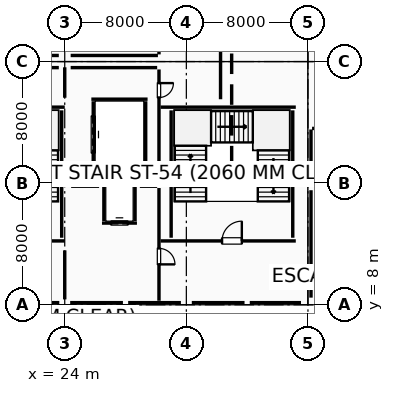
"""IFC4 building model, lengths in metres.
Left out: names, types, materials, properties, quantities, classifications, styles, units other than length and angle.
Written with IfcOpenShell. Run it as: python <this file> out.ifc"""

import sys

from ifc_helpers import new_model, si_unit, direction, frame, frame_2d, origin, origin_2d, place, context, subcontext, project, spatial, rectangle, circle, i_section, extrude, element, fill, save


model = new_model("IFC4")
c1 = context("Model", 3, precision=1e-05, world=origin(), true_north=direction((0.0, 1.0)))
c2 = subcontext(c1, "Body", "Model", "MODEL_VIEW")
j1 = project(units=[si_unit("LENGTHUNIT", "METRE"), si_unit("PLANEANGLEUNIT", "RADIAN")], contexts=[c1])
p1 = place(None, origin())
s1 = spatial("IfcSite", under=j1, at=p1, CompositionType="ELEMENT")
p2 = place(p1, origin())
s2 = spatial("IfcBuilding", under=s1, at=p2, CompositionType="ELEMENT")
p3 = place(p2, origin())
s3 = spatial("IfcBuildingStorey", under=s2, at=p3, CompositionType="ELEMENT", Elevation=0.0)
p4 = place(p3, frame((24.0, 8.0, 0.0), z_axis=(0.0, 0.0, 1.0), x_axis=(1.0, 0.0, 0.0)))
e1 = element("IfcColumn", 1, at=p4, inside=s3, PredefinedType="COLUMN", context=c2, shape_type="SweptSolid", body=[
    extrude(circle(Radius=0.35, at=origin_2d()), origin(), (0.0, 0.0, 1.0), 5.4),
])
p5 = place(p3, frame((24.0, 24.0, 0.0), z_axis=(0.0, 0.0, 1.0), x_axis=(1.0, 0.0, 0.0)))
e2 = element("IfcColumn", 2, at=p5, inside=s3, PredefinedType="COLUMN", context=c2, shape_type="SweptSolid", body=[
    extrude(rectangle(XDim=0.75, YDim=0.75, at=origin_2d()), origin(), (0.0, 0.0, 1.0), 5.4),
])
p6 = place(p3, frame((32.0, 8.0, 0.0), z_axis=(0.0, 0.0, 1.0), x_axis=(1.0, 0.0, 0.0)))
e3 = element("IfcColumn", 3, at=p6, inside=s3, PredefinedType="COLUMN", context=c2, shape_type="SweptSolid", body=[
    extrude(circle(Radius=0.35, at=origin_2d()), origin(), (0.0, 0.0, 1.0), 5.4),
])
p7 = place(p3, frame((32.0, 24.0, 0.0), z_axis=(0.0, 0.0, 1.0), x_axis=(1.0, 0.0, 0.0)))
e4 = element("IfcColumn", 4, at=p7, inside=s3, PredefinedType="COLUMN", context=c2, shape_type="SweptSolid", body=[
    extrude(rectangle(XDim=0.75, YDim=0.75, at=origin_2d()), origin(), (0.0, 0.0, 1.0), 5.4),
])
for number, where, z_axis, x_axis in (
    (5, (40.0, 8.0, 0.0), (0.0, 0.0, 1.0), (1.0, 0.0, 0.0)),
    (6, (40.0, 16.0, 0.0), (0.0, 0.0, 1.0), (1.0, 0.0, 0.0)),
    (7, (40.0, 24.0, 0.0), (0.0, 0.0, 1.0), (1.0, 0.0, 0.0)),
):
    element("IfcColumn", number, at=place(p3, frame(where, z_axis=z_axis, x_axis=x_axis)), inside=s3, PredefinedType="COLUMN", context=c2, shape_type="SweptSolid", body=[
        extrude(rectangle(XDim=0.9, YDim=0.9, at=origin_2d()), origin(), (0.0, 0.0, 1.0), 5.4),
    ])
for number, where, z_axis, x_axis in (
    (8, (33.52, 17.98, 0.0), (0.0, 0.0, 1.0), (1.0, 0.0, 0.0)),
    (9, (36.48, 17.98, 0.0), (0.0, 0.0, 1.0), (1.0, 0.0, 0.0)),
):
    element("IfcColumn", number, at=place(p3, frame(where, z_axis=z_axis, x_axis=x_axis)), inside=s3, PredefinedType="COLUMN", context=c2, shape_type="SweptSolid", body=[
        extrude(i_section(OverallWidth=0.25, OverallDepth=0.35, WebThickness=0.01, FlangeThickness=0.012, FilletRadius=0.012, at=origin_2d()), origin(), (0.0, 0.0, 1.0), 5.4),
    ])
p8 = place(p3, frame((28.0, 8.0, 0.0), z_axis=(0.0, 0.0, 1.0), x_axis=(1.0, 0.0, 0.0)))
e10 = element("IfcColumn", 10, at=p8, inside=s3, PredefinedType="PILASTER", context=c2, shape_type="SweptSolid", body=[
    extrude(rectangle(XDim=0.35, YDim=0.7, at=origin_2d()), origin(), (0.0, 0.0, 1.0), 5.4),
])
p9 = place(p3, frame((36.0, 8.0, 0.0), z_axis=(0.0, 0.0, 1.0), x_axis=(1.0, 0.0, 0.0)))
e11 = element("IfcColumn", 11, at=p9, inside=s3, PredefinedType="PILASTER", context=c2, shape_type="SweptSolid", body=[
    extrude(rectangle(XDim=0.35, YDim=0.6, at=origin_2d()), origin(), (0.0, 0.0, 1.0), 5.4),
])
p10 = place(p3, frame((39.542, 8.14, 0.0), z_axis=(0.0, 0.0, 1.0), x_axis=(-1.0, 0.0, 0.0)))
e12 = element("IfcWall", 12, at=p10, inside=s3, PredefinedType="ELEMENTEDWALL", context=c2, shape_type="SweptSolid", body=[
    extrude(rectangle(XDim=3.37, YDim=0.24, at=frame_2d((1.685, 0.0))), origin(), (0.0, 0.0, 1.0), 4.605),
])
p11 = place(p3, frame((35.828, 8.14, 0.0), z_axis=(0.0, 0.0, 1.0), x_axis=(-1.0, 0.0, 0.0)))
e13 = element("IfcWall", 13, at=p11, inside=s3, PredefinedType="ELEMENTEDWALL", context=c2, shape_type="SweptSolid", body=[
    extrude(rectangle(XDim=3.47, YDim=0.24, at=frame_2d((1.735, 0.0))), origin(), (0.0, 0.0, 1.0), 4.605),
])
for number, where, z_axis, x_axis in (
    (14, (31.642, 8.14, 0.0), (0.0, 0.0, 1.0), (-1.0, 0.0, 0.0)),
    (15, (27.828, 8.14, 0.0), (0.0, 0.0, 1.0), (-1.0, 0.0, 0.0)),
):
    element("IfcWall", number, at=place(p3, frame(where, z_axis=z_axis, x_axis=x_axis)), inside=s3, PredefinedType="ELEMENTEDWALL", context=c2, shape_type="SweptSolid", body=[
        extrude(rectangle(XDim=3.47, YDim=0.24, at=frame_2d((1.735, 0.0))), origin(), (0.0, 0.0, 1.0), 4.555),
    ])
p12 = place(p3, frame((23.642, 8.14, 0.0), z_axis=(0.0, 0.0, 1.0), x_axis=(-1.0, 0.0, 0.0)))
e16 = element("IfcWall", 16, at=p12, inside=s3, PredefinedType="ELEMENTEDWALL", context=c2, shape_type="SweptSolid", body=[
    extrude(rectangle(XDim=3.47, YDim=0.24, at=frame_2d((1.735, 0.0))), origin(), (0.0, 0.0, 1.0), 4.505),
])
p13 = place(p3, frame((30.304, 12.2, 0.0), z_axis=(0.0, 0.0, 1.0), x_axis=(1.0, 0.0, 0.0)))
e17 = element("IfcWall", 17, at=p13, inside=s3, PredefinedType="SHEAR", context=c2, shape_type="SweptSolid", body=[
    extrude(rectangle(XDim=8.896, YDim=0.4, at=frame_2d((4.448, 0.0))), origin(), (0.0, 0.0, 1.0), 5.12),
])
p14 = place(p13, frame((4.046, 0.0, 0.0)))
e18 = element("IfcOpeningElement", 18, at=p14, cuts=e17, PredefinedType="OPENING", context=c2, shape_type="SweptSolid", body=[
    extrude(rectangle(XDim=1.3, YDim=2.15, at=frame_2d((0.65, 1.075))), frame((0.0, 0.21, 0.0), z_axis=(0.0, -1.0, 0.0), x_axis=(1.0, 0.0, 0.0)), (0.0, 0.0, 1.0), 0.42),
])
p15 = place(p3, frame((39.2, 21.0, 0.0), z_axis=(0.0, 0.0, 1.0), x_axis=(-1.0, 0.0, 0.0)))
e19 = element("IfcWall", 19, at=p15, inside=s3, PredefinedType="SHEAR", context=c2, shape_type="SweptSolid", body=[
    extrude(rectangle(XDim=8.896, YDim=0.4, at=frame_2d((4.448, 0.0))), origin(), (0.0, 0.0, 1.0), 5.12),
])
for number, where, z_axis, x_axis in (
    (20, (39.0, 12.41, 0.0), (0.0, 0.0, 1.0), (0.0, 1.0, 0.0)),
    (21, (31.0, 20.79, 0.0), (0.0, 0.0, 1.0), (0.0, -1.0, 0.0)),
):
    element("IfcWall", number, at=place(p3, frame(where, z_axis=z_axis, x_axis=x_axis)), inside=s3, PredefinedType="SHEAR", context=c2, shape_type="SweptSolid", body=[
        extrude(rectangle(XDim=8.38, YDim=0.4, at=frame_2d((4.19, 0.0))), origin(), (0.0, 0.0, 1.0), 5.12),
    ])
p16 = place(p3, frame((26.45, 13.375, 0.0), z_axis=(0.0, 0.0, 1.0), x_axis=(1.0, 0.0, 0.0)))
e22 = element("IfcWall", 22, at=p16, inside=s3, PredefinedType="STANDARD", context=c2, shape_type="SweptSolid", body=[
    extrude(rectangle(XDim=2.3, YDim=0.25, at=frame_2d((1.15, 0.0))), origin(), (0.0, 0.0, 1.0), 5.11),
])
p17 = place(p16, frame((0.6, 0.0, 0.0)))
e23 = element("IfcOpeningElement", 23, at=p17, cuts=e22, PredefinedType="OPENING", context=c2, shape_type="SweptSolid", body=[
    extrude(rectangle(XDim=1.1, YDim=2.15, at=frame_2d((0.55, 1.075))), frame((0.0, 0.135, 0.0), z_axis=(0.0, -1.0, 0.0), x_axis=(1.0, 0.0, 0.0)), (0.0, 0.0, 1.0), 0.27),
])
p18 = place(p3, frame((28.75, 16.225, 0.0), z_axis=(0.0, 0.0, 1.0), x_axis=(-1.0, 0.0, 0.0)))
e24 = element("IfcWall", 24, at=p18, inside=s3, PredefinedType="STANDARD", context=c2, shape_type="SweptSolid", body=[
    extrude(rectangle(XDim=2.3, YDim=0.25, at=frame_2d((1.15, 0.0))), origin(), (0.0, 0.0, 1.0), 5.11),
])
for number, where, z_axis, x_axis in (
    (25, (28.625, 13.51, 0.0), (0.0, 0.0, 1.0), (0.0, 1.0, 0.0)),
    (26, (26.575, 16.09, 0.0), (0.0, 0.0, 1.0), (0.0, -1.0, 0.0)),
):
    element("IfcWall", number, at=place(p3, frame(where, z_axis=z_axis, x_axis=x_axis)), inside=s3, PredefinedType="STANDARD", context=c2, shape_type="SweptSolid", body=[
        extrude(rectangle(XDim=2.58, YDim=0.25, at=frame_2d((1.29, 0.0))), origin(), (0.0, 0.0, 1.0), 5.11),
    ])
for number, where, z_axis, x_axis in (
    (27, (25.75, 16.875, 0.0), (0.0, 0.0, 1.0), (1.0, 0.0, 0.0)),
    (28, (29.45, 21.525, 0.0), (0.0, 0.0, 1.0), (-1.0, 0.0, 0.0)),
):
    element("IfcWall", number, at=place(p3, frame(where, z_axis=z_axis, x_axis=x_axis)), inside=s3, PredefinedType="STANDARD", context=c2, shape_type="SweptSolid", body=[
        extrude(rectangle(XDim=3.7, YDim=0.25, at=frame_2d((1.85, 0.0))), origin(), (0.0, 0.0, 1.0), 5.11),
    ])
p19 = place(p3, frame((29.325, 17.01, 0.0), z_axis=(0.0, 0.0, 1.0), x_axis=(0.0, 1.0, 0.0)))
e29 = element("IfcWall", 29, at=p19, inside=s3, PredefinedType="STANDARD", context=c2, shape_type="SweptSolid", body=[
    extrude(rectangle(XDim=4.38, YDim=0.25, at=frame_2d((2.19, 0.0))), origin(), (0.0, 0.0, 1.0), 5.11),
])
p20 = place(p3, frame((25.875, 21.39, 0.0), z_axis=(0.0, 0.0, 1.0), x_axis=(0.0, -1.0, 0.0)))
e30 = element("IfcWall", 30, at=p20, inside=s3, PredefinedType="STANDARD", context=c2, shape_type="SweptSolid", body=[
    extrude(rectangle(XDim=4.38, YDim=0.25, at=frame_2d((2.19, 0.0))), origin(), (0.0, 0.0, 1.0), 5.11),
])
p21 = place(p20, frame((0.99, 0.0, 0.0)))
e31 = element("IfcOpeningElement", 31, at=p21, cuts=e30, PredefinedType="OPENING", context=c2, shape_type="SweptSolid", body=[
    extrude(rectangle(XDim=2.4, YDim=2.55, at=frame_2d((1.2, 1.275))), frame((0.0, 0.135, 0.0), z_axis=(0.0, -1.0, 0.0), x_axis=(1.0, 0.0, 0.0)), (0.0, 0.0, 1.0), 0.27),
])
p22 = place(p3, frame((15.95, 12.2, 0.0), z_axis=(0.0, 0.0, 1.0), x_axis=(1.0, 0.0, 0.0)))
e32 = element("IfcWall", 32, at=p22, inside=s3, PredefinedType="SHEAR", context=c2, shape_type="SweptSolid", body=[
    extrude(rectangle(XDim=8.05, YDim=0.4, at=frame_2d((4.025, 0.0))), origin(), (0.0, 0.0, 1.0), 5.12),
])
p23 = place(p22, frame((3.375, 0.0, 0.0)))
e33 = element("IfcOpeningElement", 33, at=p23, cuts=e32, PredefinedType="OPENING", context=c2, shape_type="SweptSolid", body=[
    extrude(rectangle(XDim=1.3, YDim=2.15, at=frame_2d((0.65, 1.075))), frame((0.0, 0.21, 0.0), z_axis=(0.0, -1.0, 0.0), x_axis=(1.0, 0.0, 0.0)), (0.0, 0.0, 1.0), 0.42),
])
p24 = place(p3, frame((24.0, 21.0, 0.0), z_axis=(0.0, 0.0, 1.0), x_axis=(-1.0, 0.0, 0.0)))
e34 = element("IfcWall", 34, at=p24, inside=s3, PredefinedType="SHEAR", context=c2, shape_type="SweptSolid", body=[
    extrude(rectangle(XDim=8.05, YDim=0.4, at=frame_2d((4.025, 0.0))), origin(), (0.0, 0.0, 1.0), 5.12),
])
p25 = place(p3, frame((23.8, 12.41, 0.0), z_axis=(0.0, 0.0, 1.0), x_axis=(0.0, 1.0, 0.0)))
e35 = element("IfcWall", 35, at=p25, inside=s3, PredefinedType="SHEAR", context=c2, shape_type="SweptSolid", body=[
    extrude(rectangle(XDim=8.38, YDim=0.4, at=frame_2d((4.19, 0.0))), origin(), (0.0, 0.0, 1.0), 5.12),
])
p26 = place(p3, frame((40.27, 19.6, 0.0), z_axis=(0.0, 0.0, 1.0), x_axis=(1.0, 0.0, 0.0)))
e36 = element("IfcWall", 36, at=p26, inside=s3, PredefinedType="PARTITIONING", context=c2, shape_type="SweptSolid", body=[
    extrude(rectangle(XDim=23.66, YDim=0.1, at=frame_2d((11.83, 0.0))), origin(), (0.0, 0.0, 1.0), 4.3),
])
p27 = place(p26, frame((11.305, 0.0, 0.0)))
e37 = element("IfcOpeningElement", 37, at=p27, cuts=e36, PredefinedType="OPENING", context=c2, shape_type="SweptSolid", body=[
    extrude(rectangle(XDim=1.05, YDim=2.15, at=frame_2d((0.525, 1.075))), frame((0.0, 0.06, 0.0), z_axis=(0.0, -1.0, 0.0), x_axis=(1.0, 0.0, 0.0)), (0.0, 0.0, 1.0), 0.12),
])
p28 = place(p26, frame((7.913, 0.0, 0.0)))
e38 = element("IfcOpeningElement", 38, at=p28, cuts=e36, PredefinedType="OPENING", context=c2, shape_type="SweptSolid", body=[
    extrude(rectangle(XDim=1.05, YDim=2.15, at=frame_2d((0.525, 1.075))), frame((0.0, 0.06, 0.0), z_axis=(0.0, -1.0, 0.0), x_axis=(1.0, 0.0, 0.0)), (0.0, 0.0, 1.0), 0.12),
])
p29 = place(p3, frame((40.2, 8.47, 0.0), z_axis=(0.0, 0.0, 1.0), x_axis=(0.0, 1.0, 0.0)))
e39 = element("IfcWall", 39, at=p29, inside=s3, PredefinedType="PARTITIONING", context=c2, shape_type="SweptSolid", body=[
    extrude(rectangle(XDim=7.065, YDim=0.1, at=frame_2d((3.532, 0.0))), origin(), (0.0, 0.0, 1.0), 4.6),
])
p30 = place(p3, frame((40.2, 16.465, 0.0), z_axis=(0.0, 0.0, 1.0), x_axis=(0.0, 1.0, 0.0)))
e40 = element("IfcWall", 40, at=p30, inside=s3, PredefinedType="PARTITIONING", context=c2, shape_type="SweptSolid", body=[
    extrude(rectangle(XDim=3.065, YDim=0.1, at=frame_2d((1.532, 0.0))), origin(), (0.0, 0.0, 1.0), 4.65),
])
p31 = place(p3, frame((24.0, 11.58, 0.0), z_axis=(0.0, 0.0, 1.0), x_axis=(0.0, -1.0, 0.0)))
e41 = element("IfcWall", 41, at=p31, inside=s3, PredefinedType="PARTITIONING", context=c2, shape_type="SweptSolid", body=[
    extrude(rectangle(XDim=3.226, YDim=0.2, at=frame_2d((1.613, 0.0))), origin(), (0.0, 0.0, 1.0), 5.11),
])
p32 = place(p3, frame((16.465, 23.6, 0.0), z_axis=(0.0, 0.0, 1.0), x_axis=(1.0, 0.0, 0.0)))
e42 = element("IfcWall", 42, at=p32, inside=s3, PredefinedType="PARTITIONING", context=c2, shape_type="SweptSolid", body=[
    extrude(rectangle(XDim=7.145, YDim=0.2, at=frame_2d((3.573, 0.0))), origin(), (0.0, 0.0, 1.0), 5.11),
])
p33 = place(p32, frame((3.962, 0.0, 0.0)))
e43 = element("IfcOpeningElement", 43, at=p33, cuts=e42, PredefinedType="OPENING", context=c2, shape_type="SweptSolid", body=[
    extrude(rectangle(XDim=1.05, YDim=2.15, at=frame_2d((0.525, 1.075))), frame((0.0, 0.11, 0.0), z_axis=(0.0, -1.0, 0.0), x_axis=(1.0, 0.0, 0.0)), (0.0, 0.0, 1.0), 0.22),
])
p34 = place(p3, frame((24.0, 23.621, 0.0), z_axis=(0.0, 0.0, 1.0), x_axis=(0.0, -1.0, 0.0)))
e44 = element("IfcWall", 44, at=p34, inside=s3, PredefinedType="PARTITIONING", context=c2, shape_type="SweptSolid", body=[
    extrude(rectangle(XDim=2.001, YDim=0.2, at=frame_2d((1.0, 0.0))), origin(), (0.0, 0.0, 1.0), 5.11),
])
p35 = place(p3, frame((24.42, 15.8, 0.0), z_axis=(0.0, 0.0, 1.0), x_axis=(1.0, 0.0, 0.0)))
e45 = element("IfcWall", 45, at=p35, inside=s3, PredefinedType="PARTITIONING", context=c2, shape_type="SweptSolid", body=[
    extrude(rectangle(XDim=1.84, YDim=0.2, at=frame_2d((0.92, 0.0))), origin(), (0.0, 0.0, 1.0), 5.11),
])
p36 = place(p3, frame((28.94, 15.8, 0.0), z_axis=(0.0, 0.0, 1.0), x_axis=(1.0, 0.0, 0.0)))
e46 = element("IfcWall", 46, at=p36, inside=s3, PredefinedType="PARTITIONING", context=c2, shape_type="SweptSolid", body=[
    extrude(rectangle(XDim=1.14, YDim=0.2, at=frame_2d((0.57, 0.0))), origin(), (0.0, 0.0, 1.0), 5.11),
])
p37 = place(p3, frame((30.2, 15.68, 0.0), z_axis=(0.0, 0.0, 1.0), x_axis=(0.0, -1.0, 0.0)))
e47 = element("IfcWall", 47, at=p37, inside=s3, PredefinedType="PARTITIONING", context=c2, shape_type="SweptSolid", body=[
    extrude(rectangle(XDim=7.416, YDim=0.2, at=frame_2d((3.708, 0.0))), origin(), (0.0, 0.0, 1.0), 5.11),
])
p38 = place(p37, frame((3.972, 0.0, 0.0)))
e48 = element("IfcOpeningElement", 48, at=p38, cuts=e47, PredefinedType="OPENING", context=c2, shape_type="SweptSolid", body=[
    extrude(rectangle(XDim=1.05, YDim=2.15, at=frame_2d((0.525, 1.075))), frame((0.0, 0.11, 0.0), z_axis=(0.0, -1.0, 0.0), x_axis=(1.0, 0.0, 0.0)), (0.0, 0.0, 1.0), 0.22),
])
p39 = place(p3, frame((24.39, 23.6, 0.0), z_axis=(0.0, 0.0, 1.0), x_axis=(1.0, 0.0, 0.0)))
e49 = element("IfcWall", 49, at=p39, inside=s3, PredefinedType="PARTITIONING", context=c2, shape_type="SweptSolid", body=[
    extrude(rectangle(XDim=5.69, YDim=0.2, at=frame_2d((2.845, 0.0))), origin(), (0.0, 0.0, 1.0), 5.11),
])
p40 = place(p3, frame((30.2, 23.48, 0.0), z_axis=(0.0, 0.0, 1.0), x_axis=(0.0, -1.0, 0.0)))
e50 = element("IfcWall", 50, at=p40, inside=s3, PredefinedType="PARTITIONING", context=c2, shape_type="SweptSolid", body=[
    extrude(rectangle(XDim=7.36, YDim=0.2, at=frame_2d((3.68, 0.0))), origin(), (0.0, 0.0, 1.0), 5.11),
])
p41 = place(p40, frame((0.897, 0.0, 0.0)))
e51 = element("IfcOpeningElement", 51, at=p41, cuts=e50, PredefinedType="OPENING", context=c2, shape_type="SweptSolid", body=[
    extrude(rectangle(XDim=0.95, YDim=2.15, at=frame_2d((0.475, 1.075))), frame((0.0, 0.11, 0.0), z_axis=(0.0, -1.0, 0.0), x_axis=(1.0, 0.0, 0.0)), (0.0, 0.0, 1.0), 0.22),
])
p42 = place(p3, frame((30.13, 24.4, 0.0), z_axis=(0.0, 0.0, 1.0), x_axis=(-1.0, 0.0, 0.0)))
e52 = element("IfcWall", 52, at=p42, inside=s3, PredefinedType="PARTITIONING", context=c2, shape_type="SweptSolid", body=[
    extrude(rectangle(XDim=5.74, YDim=0.1, at=frame_2d((2.87, 0.0))), origin(), (0.0, 0.0, 1.0), 5.11),
])
p43 = place(p3, frame((23.61, 24.4, 0.0), z_axis=(0.0, 0.0, 1.0), x_axis=(-1.0, 0.0, 0.0)))
e53 = element("IfcWall", 53, at=p43, inside=s3, PredefinedType="PARTITIONING", context=c2, shape_type="SweptSolid", body=[
    extrude(rectangle(XDim=7.145, YDim=0.1, at=frame_2d((3.573, 0.0))), origin(), (0.0, 0.0, 1.0), 5.11),
])
p44 = place(p3, frame((30.2, 31.93, 0.0), z_axis=(0.0, 0.0, 1.0), x_axis=(0.0, -1.0, 0.0)))
e54 = element("IfcWall", 54, at=p44, inside=s3, PredefinedType="PARTITIONING", context=c2, shape_type="SweptSolid", body=[
    extrude(rectangle(XDim=7.46, YDim=0.1, at=frame_2d((3.73, 0.0))), origin(), (0.0, 0.0, 1.0), 5.11),
])
p45 = place(p44, frame((3.255, 0.0, 0.0)))
e55 = element("IfcOpeningElement", 55, at=p45, cuts=e54, PredefinedType="OPENING", context=c2, shape_type="SweptSolid", body=[
    extrude(rectangle(XDim=0.95, YDim=2.15, at=frame_2d((0.475, 1.075))), frame((0.0, 0.06, 0.0), z_axis=(0.0, -1.0, 0.0), x_axis=(1.0, 0.0, 0.0)), (0.0, 0.0, 1.0), 0.12),
])
p46 = place(p3, frame((34.25, 21.52, 0.0), z_axis=(0.0, 0.0, 1.0), x_axis=(0.0, 1.0, 0.0)))
e56 = element("IfcWall", 56, at=p46, inside=s3, PredefinedType="PARTITIONING", context=c2, shape_type="SweptSolid", body=[
    extrude(rectangle(XDim=12.71, YDim=0.2, at=frame_2d((6.355, 0.0))), origin(), (0.0, 0.0, 1.0), 5.11),
])
p47 = place(p46, frame((5.455, 0.0, 0.0)))
e57 = element("IfcOpeningElement", 57, at=p47, cuts=e56, PredefinedType="OPENING", context=c2, shape_type="SweptSolid", body=[
    extrude(rectangle(XDim=1.8, YDim=2.15, at=frame_2d((0.9, 1.075))), frame((0.0, 0.11, 0.0), z_axis=(0.0, -1.0, 0.0), x_axis=(1.0, 0.0, 0.0)), (0.0, 0.0, 1.0), 0.22),
])
p48 = place(p14, origin())
e58 = element("IfcDoor", 58, at=p48, inside=s3, OperationType="SINGLE_SWING_RIGHT", PredefinedType="DOOR", context=c2, shape_type="SweptSolid", body=[
    extrude(rectangle(XDim=1.3, YDim=2.15, at=frame_2d((0.65, 1.075))), frame((0.0, 0.025, 0.0), z_axis=(0.0, -1.0, 0.0), x_axis=(1.0, 0.0, 0.0)), (0.0, 0.0, 1.0), 0.05),
])
fill(e18, e58)
p49 = place(p17, origin())
e59 = element("IfcDoor", 59, at=p49, inside=s3, OperationType="DOUBLE_DOOR_SLIDING", PredefinedType="DOOR", context=c2, shape_type="SweptSolid", body=[
    extrude(rectangle(XDim=1.1, YDim=2.15, at=frame_2d((0.55, 1.075))), frame((0.0, 0.025, 0.0), z_axis=(0.0, -1.0, 0.0), x_axis=(1.0, 0.0, 0.0)), (0.0, 0.0, 1.0), 0.05),
])
fill(e23, e59)
p50 = place(p21, origin())
e60 = element("IfcDoor", 60, at=p50, inside=s3, OperationType="DOUBLE_DOOR_SLIDING", PredefinedType="DOOR", context=c2, shape_type="SweptSolid", body=[
    extrude(rectangle(XDim=2.4, YDim=2.55, at=frame_2d((1.2, 1.275))), frame((0.0, 0.025, 0.0), z_axis=(0.0, -1.0, 0.0), x_axis=(1.0, 0.0, 0.0)), (0.0, 0.0, 1.0), 0.05),
])
fill(e31, e60)
p51 = place(p38, origin())
e61 = element("IfcDoor", 61, at=p51, inside=s3, OperationType="SINGLE_SWING_RIGHT", PredefinedType="DOOR", context=c2, shape_type="SweptSolid", body=[
    extrude(rectangle(XDim=1.05, YDim=2.15, at=frame_2d((0.525, 1.075))), frame((0.0, 0.025, 0.0), z_axis=(0.0, -1.0, 0.0), x_axis=(1.0, 0.0, 0.0)), (0.0, 0.0, 1.0), 0.05),
])
fill(e48, e61)
p52 = place(p41, origin())
e62 = element("IfcDoor", 62, at=p52, inside=s3, OperationType="SINGLE_SWING_LEFT", PredefinedType="DOOR", context=c2, shape_type="SweptSolid", body=[
    extrude(rectangle(XDim=0.95, YDim=2.15, at=frame_2d((0.475, 1.075))), frame((0.0, 0.025, 0.0), z_axis=(0.0, -1.0, 0.0), x_axis=(1.0, 0.0, 0.0)), (0.0, 0.0, 1.0), 0.05),
])
fill(e51, e62)
save(model, sys.argv[1])
